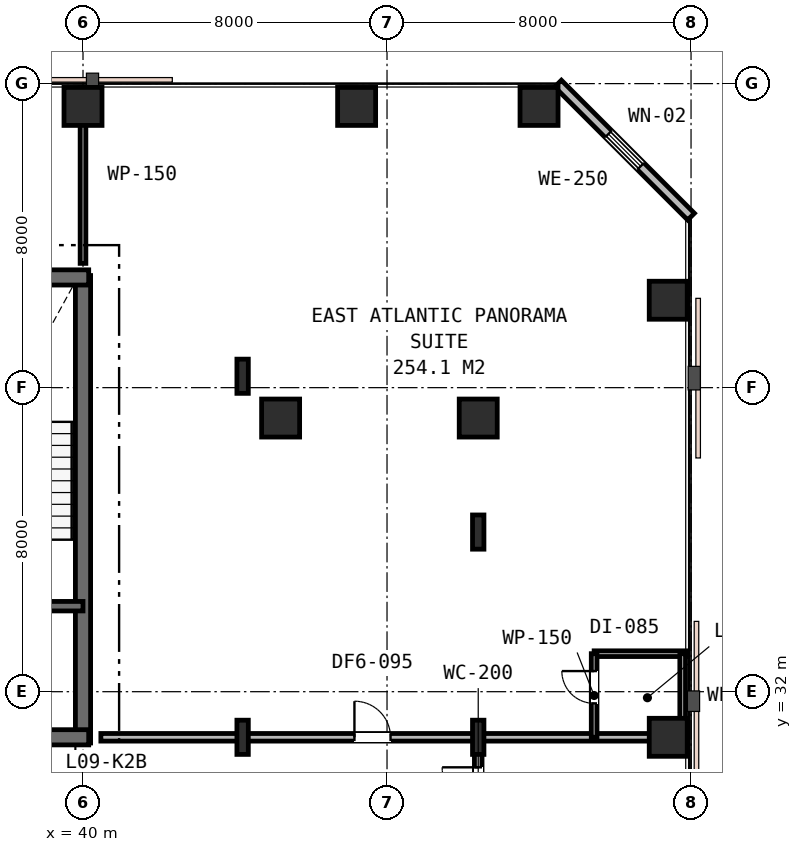
"""IFC4 building model, lengths in metres.
Left out: names, types, materials, properties, quantities, classifications, styles, units other than length and angle.
Written with IfcOpenShell. Run it as: python <this file> out.ifc"""

import sys

from ifc_helpers import new_model, si_unit, direction, frame, frame_2d, origin, origin_2d, place, context, subcontext, project, spatial, rectangle, i_section, extrude, element, fill, save


model = new_model("IFC4")
c1 = context("Model", 3, precision=1e-05, world=origin(), true_north=direction((0.0, 1.0)))
c2 = subcontext(c1, "Body", "Model", "MODEL_VIEW")
j1 = project(units=[si_unit("LENGTHUNIT", "METRE"), si_unit("PLANEANGLEUNIT", "RADIAN")], contexts=[c1])
p1 = place(None, origin())
s1 = spatial("IfcSite", under=j1, at=p1, CompositionType="ELEMENT")
p2 = place(p1, origin())
s2 = spatial("IfcBuilding", under=s1, at=p2, CompositionType="ELEMENT")
p3 = place(p2, frame((0.0, 0.0, 40.2)))
s3 = spatial("IfcBuildingStorey", under=s2, at=p3, CompositionType="ELEMENT", Elevation=40.2)
p4 = place(p3, frame((40.0, 30.65, 0.0), z_axis=(0.0, 0.0, 1.0), x_axis=(0.0, 1.0, 0.0)))
e1 = element("IfcWall", 1, at=p4, inside=s3, PredefinedType="SHEAR", context=c2, shape_type="SweptSolid", body=[
    extrude(rectangle(XDim=12.3, YDim=0.4, at=frame_2d((6.15, 0.0))), origin(), (0.0, 0.0, 1.0), 3.6),
])
p5 = place(p3, frame((15.85, 42.9, 0.0), z_axis=(0.0, 0.0, 1.0), x_axis=(1.0, 0.0, 0.0)))
e2 = element("IfcWall", 2, at=p5, inside=s3, PredefinedType="SHEAR", context=c2, shape_type="SweptSolid", body=[
    extrude(rectangle(XDim=24.3, YDim=0.4, at=frame_2d((12.15, 0.0))), origin(), (0.0, 0.0, 1.0), 3.6),
])
p6 = place(p3, frame((28.95, 30.8, 0.0), z_axis=(0.0, 0.0, 1.0), x_axis=(1.0, 0.0, 0.0)))
e3 = element("IfcWall", 3, at=p6, inside=s3, PredefinedType="SHEAR", context=c2, shape_type="SweptSolid", body=[
    extrude(rectangle(XDim=11.2, YDim=0.4, at=frame_2d((5.6, 0.0))), origin(), (0.0, 0.0, 1.0), 3.6),
])
p7 = place(p6, frame((7.65, 0.0, 0.0)))
e4 = element("IfcOpeningElement", 4, at=p7, cuts=e3, PredefinedType="OPENING", context=c2, shape_type="SweptSolid", body=[
    extrude(rectangle(XDim=1.1, YDim=2.15, at=frame_2d((0.55, 1.075))), frame((0.0, 0.21, 0.0), z_axis=(0.0, -1.0, 0.0), x_axis=(1.0, 0.0, 0.0)), (0.0, 0.0, 1.0), 0.42),
])
p8 = place(p3, frame((33.95, 34.25, 0.0), z_axis=(0.0, 0.0, 1.0), x_axis=(1.0, 0.0, 0.0)))
e5 = element("IfcWall", 5, at=p8, inside=s3, PredefinedType="SHEAR", context=c2, shape_type="SweptSolid", body=[
    extrude(rectangle(XDim=6.05, YDim=0.25, at=frame_2d((3.025, 0.0))), origin(), (0.0, 0.0, 1.0), 3.6),
])
p9 = place(p8, frame((3.7, 0.0, 0.0)))
e6 = element("IfcOpeningElement", 6, at=p9, cuts=e5, PredefinedType="OPENING", context=c2, shape_type="SweptSolid", body=[
    extrude(rectangle(XDim=1.0, YDim=2.15, at=frame_2d((0.5, 1.075))), frame((0.0, 0.135, 0.0), z_axis=(0.0, -1.0, 0.0), x_axis=(1.0, 0.0, 0.0)), (0.0, 0.0, 1.0), 0.27),
])
p10 = place(p8, frame((0.55, 0.0, 0.0)))
e7 = element("IfcOpeningElement", 7, at=p10, cuts=e5, PredefinedType="OPENING", context=c2, shape_type="SweptSolid", body=[
    extrude(rectangle(XDim=1.1, YDim=2.15, at=frame_2d((0.55, 1.075))), frame((0.0, 0.135, 0.0), z_axis=(0.0, -1.0, 0.0), x_axis=(1.0, 0.0, 0.0)), (0.0, 0.0, 1.0), 0.27),
])
for number, where, z_axis, x_axis in (
    (8, (45.2, 39.2, 0.0), (0.0, 0.0, 1.0), (1.0, 0.0, 0.0)),
    (9, (40.0, 47.4, 0.0), (0.0, 0.0, 1.0), (1.0, 0.0, 0.0)),
    (10, (47.2, 47.4, 0.0), (0.0, 0.0, 1.0), (1.0, 0.0, 0.0)),
    (11, (50.4, 39.2, 0.0), (0.0, 0.0, 1.0), (1.0, 0.0, 0.0)),
    (12, (55.4, 30.8, 0.0), (0.0, 0.0, 1.0), (1.0, 0.0, 0.0)),
    (13, (55.4, 42.3, 0.0), (0.0, 0.0, 1.0), (1.0, 0.0, 0.0)),
    (14, (52.0, 47.4, 0.0), (0.0, 0.0, 1.0), (1.0, 0.0, 0.0)),
):
    element("IfcColumn", number, at=place(p3, frame(where, z_axis=z_axis, x_axis=x_axis)), inside=s3, PredefinedType="COLUMN", context=c2, shape_type="SweptSolid", body=[
        extrude(rectangle(XDim=1.0, YDim=1.0, at=origin_2d()), origin(), (0.0, 0.0, 1.0), 3.6),
    ])
for number, where, z_axis, x_axis in (
    (15, (44.2, 30.8, 0.0), (0.0, 0.0, 1.0), (1.0, 0.0, 0.0)),
    (16, (44.2, 40.3, 0.0), (0.0, 0.0, 1.0), (1.0, 0.0, 0.0)),
    (17, (50.4, 30.8, 0.0), (0.0, 0.0, 1.0), (1.0, 0.0, 0.0)),
    (18, (50.4, 36.2, 0.0), (0.0, 0.0, 1.0), (1.0, 0.0, 0.0)),
):
    element("IfcColumn", number, at=place(p3, frame(where, z_axis=z_axis, x_axis=x_axis)), inside=s3, PredefinedType="COLUMN", context=c2, shape_type="SweptSolid", body=[
        extrude(i_section(OverallWidth=0.3, OverallDepth=0.9, WebThickness=0.018, FlangeThickness=0.035, FilletRadius=0.03, at=origin_2d()), origin(), (0.0, 0.0, 1.0), 3.6),
    ])
p11 = place(p3, frame((56.0, 44.5, 0.0), z_axis=(0.0, 0.0, 1.0), x_axis=(-0.707106781187, 0.707106781187, 0.0)))
e19 = element("IfcWall", 19, at=p11, inside=s3, PredefinedType="STANDARD", context=c2, shape_type="SweptSolid", body=[
    extrude(rectangle(XDim=4.95, YDim=0.25, at=frame_2d((2.475, 0.0))), origin(), (0.0, 0.0, 1.0), 3.33),
])
p12 = place(p11, frame((1.875, 0.0, 0.85)))
e20 = element("IfcOpeningElement", 20, at=p12, cuts=e19, PredefinedType="OPENING", context=c2, shape_type="SweptSolid", body=[
    extrude(rectangle(XDim=1.2, YDim=1.6, at=frame_2d((0.6, 0.8))), frame((0.0, 0.135, 0.0), z_axis=(0.0, -1.0, 0.0), x_axis=(1.0, 0.0, 0.0)), (0.0, 0.0, 1.0), 0.27),
])
p13 = place(p3, frame((40.0, 43.27, 0.0), z_axis=(0.0, 0.0, 1.0), x_axis=(0.0, 1.0, 0.0)))
e21 = element("IfcWall", 21, at=p13, inside=s3, PredefinedType="PARTITIONING", context=c2, shape_type="SweptSolid", body=[
    extrude(rectangle(XDim=4.63, YDim=0.15, at=frame_2d((2.315, 0.0))), origin(), (0.0, 0.0, 1.0), 2.93),
])
p14 = place(p3, frame((40.47, 30.8, 0.0), z_axis=(0.0, 0.0, 1.0), x_axis=(1.0, 0.0, 0.0)))
e22 = element("IfcWall", 22, at=p14, inside=s3, PredefinedType="PARTITIONING", context=c2, shape_type="SweptSolid", body=[
    extrude(rectangle(XDim=15.43, YDim=0.2, at=frame_2d((7.715, 0.0))), origin(), (0.0, 0.0, 1.0), 2.82),
])
p15 = place(p14, frame((6.673, 0.0, 0.0)))
e23 = element("IfcOpeningElement", 23, at=p15, cuts=e22, PredefinedType="OPENING", context=c2, shape_type="SweptSolid", body=[
    extrude(rectangle(XDim=0.95, YDim=2.15, at=frame_2d((0.475, 1.075))), frame((0.0, 0.11, 0.0), z_axis=(0.0, -1.0, 0.0), x_axis=(1.0, 0.0, 0.0)), (0.0, 0.0, 1.0), 0.22),
])
p16 = place(p3, frame((53.45, 33.0, 0.0), z_axis=(0.0, 0.0, 1.0), x_axis=(1.0, 0.0, 0.0)))
e24 = element("IfcWall", 24, at=p16, inside=s3, PredefinedType="PARTITIONING", context=c2, shape_type="SweptSolid", body=[
    extrude(rectangle(XDim=2.45, YDim=0.15, at=frame_2d((1.225, 0.0))), origin(), (0.0, 0.0, 1.0), 2.93),
])
p17 = place(p3, frame((53.45, 30.8, 0.0), z_axis=(0.0, 0.0, 1.0), x_axis=(0.0, 1.0, 0.0)))
e25 = element("IfcWall", 25, at=p17, inside=s3, PredefinedType="PARTITIONING", context=c2, shape_type="SweptSolid", body=[
    extrude(rectangle(XDim=2.2, YDim=0.15, at=frame_2d((1.1, 0.0))), origin(), (0.0, 0.0, 1.0), 2.82),
])
p18 = place(p17, frame((0.892, 0.0, 0.0)))
e26 = element("IfcOpeningElement", 26, at=p18, cuts=e25, PredefinedType="OPENING", context=c2, shape_type="SweptSolid", body=[
    extrude(rectangle(XDim=0.85, YDim=2.15, at=frame_2d((0.425, 1.075))), frame((0.0, 0.085, 0.0), z_axis=(0.0, -1.0, 0.0), x_axis=(1.0, 0.0, 0.0)), (0.0, 0.0, 1.0), 0.17),
])
p19 = place(p3, frame((55.78, 33.0, 0.0), z_axis=(0.0, 0.0, 1.0), x_axis=(0.0, -1.0, 0.0)))
e27 = element("IfcWall", 27, at=p19, inside=s3, PredefinedType="PARTITIONING", context=c2, shape_type="SweptSolid", body=[
    extrude(rectangle(XDim=2.2, YDim=0.15, at=frame_2d((1.1, 0.0))), origin(), (0.0, 0.0, 1.0), 2.82),
])
p20 = place(p3, frame((50.4, 28.6, 0.0), z_axis=(0.0, 0.0, 1.0), x_axis=(0.0, 1.0, 0.0)))
e28 = element("IfcWall", 28, at=p20, inside=s3, PredefinedType="PARTITIONING", context=c2, shape_type="SweptSolid", body=[
    extrude(rectangle(XDim=2.2, YDim=0.2, at=frame_2d((1.1, 0.0))), origin(), (0.0, 0.0, 1.0), 2.82),
])
p21 = place(p20, frame((0.46, 0.0, 0.0)))
e29 = element("IfcOpeningElement", 29, at=p21, cuts=e28, PredefinedType="OPENING", context=c2, shape_type="SweptSolid", body=[
    extrude(rectangle(XDim=0.95, YDim=2.15, at=frame_2d((0.475, 1.075))), frame((0.0, 0.11, 0.0), z_axis=(0.0, -1.0, 0.0), x_axis=(1.0, 0.0, 0.0)), (0.0, 0.0, 1.0), 0.22),
])
p22 = place(p12, origin())
e30 = element("IfcWindow", 30, at=p22, inside=s3, PartitioningType="SINGLE_PANEL", PredefinedType="WINDOW", context=c2, shape_type="SweptSolid", body=[
    extrude(rectangle(XDim=1.2, YDim=1.6, at=frame_2d((0.6, 0.8))), frame((0.0, 0.03, 0.0), z_axis=(0.0, -1.0, 0.0), x_axis=(1.0, 0.0, 0.0)), (0.0, 0.0, 1.0), 0.06),
])
fill(e20, e30)
p23 = place(p15, origin())
e31 = element("IfcDoor", 31, at=p23, inside=s3, OperationType="SINGLE_SWING_LEFT", PredefinedType="DOOR", context=c2, shape_type="SweptSolid", body=[
    extrude(rectangle(XDim=0.95, YDim=2.15, at=frame_2d((0.475, 1.075))), frame((0.0, 0.025, 0.0), z_axis=(0.0, -1.0, 0.0), x_axis=(1.0, 0.0, 0.0)), (0.0, 0.0, 1.0), 0.05),
])
fill(e23, e31)
p24 = place(p18, origin())
e32 = element("IfcDoor", 32, at=p24, inside=s3, OperationType="SINGLE_SWING_RIGHT", PredefinedType="DOOR", context=c2, shape_type="SweptSolid", body=[
    extrude(rectangle(XDim=0.85, YDim=2.15, at=frame_2d((0.425, 1.075))), frame((0.0, 0.025, 0.0), z_axis=(0.0, -1.0, 0.0), x_axis=(1.0, 0.0, 0.0)), (0.0, 0.0, 1.0), 0.05),
])
fill(e26, e32)
p25 = place(p21, origin())
e33 = element("IfcDoor", 33, at=p25, inside=s3, OperationType="SINGLE_SWING_RIGHT", PredefinedType="DOOR", context=c2, shape_type="SweptSolid", body=[
    extrude(rectangle(XDim=0.95, YDim=2.15, at=frame_2d((0.475, 1.075))), frame((0.0, 0.025, 0.0), z_axis=(0.0, -1.0, 0.0), x_axis=(1.0, 0.0, 0.0)), (0.0, 0.0, 1.0), 0.05),
])
fill(e29, e33)
save(model, sys.argv[1])
